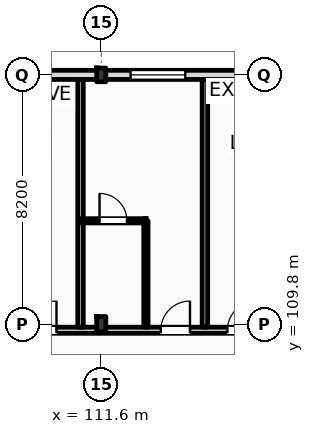
"""IFC4 building model, lengths in metres.
Left out: names, types, materials, properties, quantities, classifications, styles, units other than length and angle.
Written with IfcOpenShell. Run it as: python <this file> out.ifc"""

import sys

from ifc_helpers import new_model, si_unit, direction, frame, frame_2d, origin, origin_2d, place, context, subcontext, project, spatial, rectangle, i_section, extrude, element, fill, save


model = new_model("IFC4")
c1 = context("Model", 3, precision=1e-05, world=origin(), true_north=direction((0.0, 1.0)))
c2 = subcontext(c1, "Body", "Model", "MODEL_VIEW")
j1 = project(units=[si_unit("LENGTHUNIT", "METRE"), si_unit("PLANEANGLEUNIT", "RADIAN")], contexts=[c1])
p1 = place(None, origin())
s1 = spatial("IfcSite", under=j1, at=p1, CompositionType="ELEMENT")
p2 = place(p1, origin())
s2 = spatial("IfcBuilding", under=s1, at=p2, CompositionType="ELEMENT")
p3 = place(p2, frame((0.0, 0.0, 28.2)))
s3 = spatial("IfcBuildingStorey", under=s2, at=p3, CompositionType="ELEMENT", Elevation=28.2)
p4 = place(p3, frame((111.6, 109.8, 0.0), z_axis=(0.0, 0.0, 1.0), x_axis=(1.0, 0.0, 0.0)))
e1 = element("IfcColumn", 1, at=p4, inside=s3, PredefinedType="COLUMN", context=c2, shape_type="SweptSolid", body=[
    extrude(i_section(OverallWidth=0.3, OverallDepth=0.5, WebThickness=0.014, FlangeThickness=0.028, FilletRadius=0.027, at=origin_2d()), origin(), (0.0, 0.0, 1.0), 3.6),
])
p5 = place(p3, frame((111.6, 118.0, 0.0), z_axis=(0.0, 0.0, 1.0), x_axis=(1.0, 0.0, 0.0)))
e2 = element("IfcColumn", 2, at=p5, inside=s3, PredefinedType="COLUMN", context=c2, shape_type="SweptSolid", body=[
    extrude(i_section(OverallWidth=0.3, OverallDepth=0.45, WebThickness=0.014, FlangeThickness=0.026, FilletRadius=0.027, at=origin_2d()), origin(), (0.0, 0.0, 1.0), 3.6),
])
p6 = place(p3, frame((22.5, 118.0, 0.0), z_axis=(0.0, 0.0, 1.0), x_axis=(1.0, 0.0, 0.0)))
e3 = element("IfcWall", 3, at=p6, inside=s3, PredefinedType="STANDARD", context=c2, shape_type="SweptSolid", body=[
    extrude(rectangle(XDim=97.5, YDim=0.3, at=frame_2d((48.75, 0.0))), origin(), (0.0, 0.0, 1.0), 2.8),
])
p7 = place(p6, frame((0.91, 0.0, 0.9)))
e4 = element("IfcOpeningElement", 4, at=p7, cuts=e3, PredefinedType="OPENING", context=c2, shape_type="SweptSolid", body=[
    extrude(rectangle(XDim=0.9, YDim=1.72, at=frame_2d((0.45, 0.86))), frame((0.0, 0.16, 0.0), z_axis=(0.0, -1.0, 0.0), x_axis=(1.0, 0.0, 0.0)), (0.0, 0.0, 1.0), 0.32),
])
p8 = place(p6, frame((6.561, 0.0, 0.0)))
e5 = element("IfcOpeningElement", 5, at=p8, cuts=e3, PredefinedType="OPENING", context=c2, shape_type="SweptSolid", body=[
    extrude(rectangle(XDim=1.2, YDim=2.25, at=frame_2d((0.6, 1.125))), frame((0.0, 0.16, 0.0), z_axis=(0.0, -1.0, 0.0), x_axis=(1.0, 0.0, 0.0)), (0.0, 0.0, 1.0), 0.32),
])
p9 = place(p6, frame((11.477, 0.0, 0.9)))
e6 = element("IfcOpeningElement", 6, at=p9, cuts=e3, PredefinedType="OPENING", context=c2, shape_type="SweptSolid", body=[
    extrude(rectangle(XDim=1.1, YDim=1.5, at=frame_2d((0.55, 0.75))), frame((0.0, 0.16, 0.0), z_axis=(0.0, -1.0, 0.0), x_axis=(1.0, 0.0, 0.0)), (0.0, 0.0, 1.0), 0.32),
])
p10 = place(p6, frame((15.194, 0.0, 0.9)))
e7 = element("IfcOpeningElement", 7, at=p10, cuts=e3, PredefinedType="OPENING", context=c2, shape_type="SweptSolid", body=[
    extrude(rectangle(XDim=1.25, YDim=1.6, at=frame_2d((0.625, 0.8))), frame((0.0, 0.16, 0.0), z_axis=(0.0, -1.0, 0.0), x_axis=(1.0, 0.0, 0.0)), (0.0, 0.0, 1.0), 0.32),
])
p11 = place(p6, frame((19.509, 0.0, 0.9)))
e8 = element("IfcOpeningElement", 8, at=p11, cuts=e3, PredefinedType="OPENING", context=c2, shape_type="SweptSolid", body=[
    extrude(rectangle(XDim=1.4, YDim=1.7, at=frame_2d((0.7, 0.85))), frame((0.0, 0.16, 0.0), z_axis=(0.0, -1.0, 0.0), x_axis=(1.0, 0.0, 0.0)), (0.0, 0.0, 1.0), 0.32),
])
p12 = place(p6, frame((23.258, 0.0, 0.0)))
e9 = element("IfcOpeningElement", 9, at=p12, cuts=e3, PredefinedType="OPENING", context=c2, shape_type="SweptSolid", body=[
    extrude(rectangle(XDim=1.2, YDim=2.25, at=frame_2d((0.6, 1.125))), frame((0.0, 0.16, 0.0), z_axis=(0.0, -1.0, 0.0), x_axis=(1.0, 0.0, 0.0)), (0.0, 0.0, 1.0), 0.32),
])
p13 = place(p6, frame((28.115, 0.0, 0.9)))
e10 = element("IfcOpeningElement", 10, at=p13, cuts=e3, PredefinedType="OPENING", context=c2, shape_type="SweptSolid", body=[
    extrude(rectangle(XDim=1.75, YDim=1.72, at=frame_2d((0.875, 0.86))), frame((0.0, 0.16, 0.0), z_axis=(0.0, -1.0, 0.0), x_axis=(1.0, 0.0, 0.0)), (0.0, 0.0, 1.0), 0.32),
])
p14 = place(p6, frame((31.582, 0.0, 0.9)))
e11 = element("IfcOpeningElement", 11, at=p14, cuts=e3, PredefinedType="OPENING", context=c2, shape_type="SweptSolid", body=[
    extrude(rectangle(XDim=1.35, YDim=1.72, at=frame_2d((0.675, 0.86))), frame((0.0, 0.16, 0.0), z_axis=(0.0, -1.0, 0.0), x_axis=(1.0, 0.0, 0.0)), (0.0, 0.0, 1.0), 0.32),
])
p15 = place(p6, frame((37.379, 0.0, 0.0)))
e12 = element("IfcOpeningElement", 12, at=p15, cuts=e3, PredefinedType="OPENING", context=c2, shape_type="SweptSolid", body=[
    extrude(rectangle(XDim=1.2, YDim=2.25, at=frame_2d((0.6, 1.125))), frame((0.0, 0.16, 0.0), z_axis=(0.0, -1.0, 0.0), x_axis=(1.0, 0.0, 0.0)), (0.0, 0.0, 1.0), 0.32),
])
p16 = place(p6, frame((42.663, 0.0, 0.9)))
e13 = element("IfcOpeningElement", 13, at=p16, cuts=e3, PredefinedType="OPENING", context=c2, shape_type="SweptSolid", body=[
    extrude(rectangle(XDim=1.35, YDim=1.72, at=frame_2d((0.675, 0.86))), frame((0.0, 0.16, 0.0), z_axis=(0.0, -1.0, 0.0), x_axis=(1.0, 0.0, 0.0)), (0.0, 0.0, 1.0), 0.32),
])
p17 = place(p6, frame((45.119, 0.0, 0.9)))
e14 = element("IfcOpeningElement", 14, at=p17, cuts=e3, PredefinedType="OPENING", context=c2, shape_type="SweptSolid", body=[
    extrude(rectangle(XDim=2.871, YDim=1.72, at=frame_2d((1.436, 0.86))), frame((0.0, 0.16, 0.0), z_axis=(0.0, -1.0, 0.0), x_axis=(1.0, 0.0, 0.0)), (0.0, 0.0, 1.0), 0.32),
])
p18 = place(p6, frame((50.41, 0.0, 0.9)))
e15 = element("IfcOpeningElement", 15, at=p18, cuts=e3, PredefinedType="OPENING", context=c2, shape_type="SweptSolid", body=[
    extrude(rectangle(XDim=1.8, YDim=1.72, at=frame_2d((0.9, 0.86))), frame((0.0, 0.16, 0.0), z_axis=(0.0, -1.0, 0.0), x_axis=(1.0, 0.0, 0.0)), (0.0, 0.0, 1.0), 0.32),
])
p19 = place(p6, frame((54.375, 0.0, 0.0)))
e16 = element("IfcOpeningElement", 16, at=p19, cuts=e3, PredefinedType="OPENING", context=c2, shape_type="SweptSolid", body=[
    extrude(rectangle(XDim=1.2, YDim=2.25, at=frame_2d((0.6, 1.125))), frame((0.0, 0.16, 0.0), z_axis=(0.0, -1.0, 0.0), x_axis=(1.0, 0.0, 0.0)), (0.0, 0.0, 1.0), 0.32),
])
p20 = place(p6, frame((59.052, 0.0, 0.9)))
e17 = element("IfcOpeningElement", 17, at=p20, cuts=e3, PredefinedType="OPENING", context=c2, shape_type="SweptSolid", body=[
    extrude(rectangle(XDim=1.35, YDim=1.72, at=frame_2d((0.675, 0.86))), frame((0.0, 0.16, 0.0), z_axis=(0.0, -1.0, 0.0), x_axis=(1.0, 0.0, 0.0)), (0.0, 0.0, 1.0), 0.32),
])
p21 = place(p6, frame((62.768, 0.0, 0.9)))
e18 = element("IfcOpeningElement", 18, at=p21, cuts=e3, PredefinedType="OPENING", context=c2, shape_type="SweptSolid", body=[
    extrude(rectangle(XDim=1.5, YDim=1.72, at=frame_2d((0.75, 0.86))), frame((0.0, 0.16, 0.0), z_axis=(0.0, -1.0, 0.0), x_axis=(1.0, 0.0, 0.0)), (0.0, 0.0, 1.0), 0.32),
])
p22 = place(p6, frame((68.498, 0.0, 0.0)))
e19 = element("IfcOpeningElement", 19, at=p22, cuts=e3, PredefinedType="OPENING", context=c2, shape_type="SweptSolid", body=[
    extrude(rectangle(XDim=1.2, YDim=2.25, at=frame_2d((0.6, 1.125))), frame((0.0, 0.16, 0.0), z_axis=(0.0, -1.0, 0.0), x_axis=(1.0, 0.0, 0.0)), (0.0, 0.0, 1.0), 0.32),
])
p23 = place(p6, frame((71.265, 0.0, 0.9)))
e20 = element("IfcOpeningElement", 20, at=p23, cuts=e3, PredefinedType="OPENING", context=c2, shape_type="SweptSolid", body=[
    extrude(rectangle(XDim=0.9, YDim=1.72, at=frame_2d((0.45, 0.86))), frame((0.0, 0.16, 0.0), z_axis=(0.0, -1.0, 0.0), x_axis=(1.0, 0.0, 0.0)), (0.0, 0.0, 1.0), 0.32),
])
p24 = place(p6, frame((76.316, 0.0, 0.9)))
e21 = element("IfcOpeningElement", 21, at=p24, cuts=e3, PredefinedType="OPENING", context=c2, shape_type="SweptSolid", body=[
    extrude(rectangle(XDim=1.95, YDim=1.72, at=frame_2d((0.975, 0.86))), frame((0.0, 0.16, 0.0), z_axis=(0.0, -1.0, 0.0), x_axis=(1.0, 0.0, 0.0)), (0.0, 0.0, 1.0), 0.32),
])
p25 = place(p6, frame((81.632, 0.0, 0.9)))
e22 = element("IfcOpeningElement", 22, at=p25, cuts=e3, PredefinedType="OPENING", context=c2, shape_type="SweptSolid", body=[
    extrude(rectangle(XDim=1.35, YDim=1.72, at=frame_2d((0.675, 0.86))), frame((0.0, 0.16, 0.0), z_axis=(0.0, -1.0, 0.0), x_axis=(1.0, 0.0, 0.0)), (0.0, 0.0, 1.0), 0.32),
])
p26 = place(p6, frame((84.948, 0.0, 0.9)))
e23 = element("IfcOpeningElement", 23, at=p26, cuts=e3, PredefinedType="OPENING", context=c2, shape_type="SweptSolid", body=[
    extrude(rectangle(XDim=2.25, YDim=1.72, at=frame_2d((1.125, 0.86))), frame((0.0, 0.16, 0.0), z_axis=(0.0, -1.0, 0.0), x_axis=(1.0, 0.0, 0.0)), (0.0, 0.0, 1.0), 0.32),
])
p27 = place(p6, frame((90.063, 0.0, 0.9)))
e24 = element("IfcOpeningElement", 24, at=p27, cuts=e3, PredefinedType="OPENING", context=c2, shape_type="SweptSolid", body=[
    extrude(rectangle(XDim=1.8, YDim=1.72, at=frame_2d((0.9, 0.86))), frame((0.0, 0.16, 0.0), z_axis=(0.0, -1.0, 0.0), x_axis=(1.0, 0.0, 0.0)), (0.0, 0.0, 1.0), 0.32),
])
p28 = place(p6, frame((93.529, 0.0, 0.9)))
e25 = element("IfcOpeningElement", 25, at=p28, cuts=e3, PredefinedType="OPENING", context=c2, shape_type="SweptSolid", body=[
    extrude(rectangle(XDim=2.55, YDim=1.72, at=frame_2d((1.275, 0.86))), frame((0.0, 0.16, 0.0), z_axis=(0.0, -1.0, 0.0), x_axis=(1.0, 0.0, 0.0)), (0.0, 0.0, 1.0), 0.32),
])
p29 = place(p3, frame((10.65, 109.6, 0.0), z_axis=(0.0, 0.0, 1.0), x_axis=(1.0, 0.0, 0.0)))
e26 = element("IfcWall", 26, at=p29, inside=s3, PredefinedType="PARTITIONING", context=c2, shape_type="SweptSolid", body=[
    extrude(rectangle(XDim=109.21, YDim=0.2, at=frame_2d((54.605, 0.0))), origin(), (0.0, 0.0, 1.0), 2.8),
])
p30 = place(p29, frame((12.611, 0.0, 0.0)))
e27 = element("IfcOpeningElement", 27, at=p30, cuts=e26, PredefinedType="OPENING", context=c2, shape_type="SweptSolid", body=[
    extrude(rectangle(XDim=1.02, YDim=2.2, at=frame_2d((0.51, 1.1))), frame((0.0, 0.11, 0.0), z_axis=(0.0, -1.0, 0.0), x_axis=(1.0, 0.0, 0.0)), (0.0, 0.0, 1.0), 0.22),
])
p31 = place(p29, frame((19.451, 0.0, 0.0)))
e28 = element("IfcOpeningElement", 28, at=p31, cuts=e26, PredefinedType="OPENING", context=c2, shape_type="SweptSolid", body=[
    extrude(rectangle(XDim=1.02, YDim=2.2, at=frame_2d((0.51, 1.1))), frame((0.0, 0.11, 0.0), z_axis=(0.0, -1.0, 0.0), x_axis=(1.0, 0.0, 0.0)), (0.0, 0.0, 1.0), 0.22),
])
p32 = place(p29, frame((23.842, 0.0, 0.0)))
e29 = element("IfcOpeningElement", 29, at=p32, cuts=e26, PredefinedType="OPENING", context=c2, shape_type="SweptSolid", body=[
    extrude(rectangle(XDim=1.02, YDim=2.2, at=frame_2d((0.51, 1.1))), frame((0.0, 0.11, 0.0), z_axis=(0.0, -1.0, 0.0), x_axis=(1.0, 0.0, 0.0)), (0.0, 0.0, 1.0), 0.22),
])
p33 = place(p29, frame((26.084, 0.0, 0.0)))
e30 = element("IfcOpeningElement", 30, at=p33, cuts=e26, PredefinedType="OPENING", context=c2, shape_type="SweptSolid", body=[
    extrude(rectangle(XDim=1.02, YDim=2.2, at=frame_2d((0.51, 1.1))), frame((0.0, 0.11, 0.0), z_axis=(0.0, -1.0, 0.0), x_axis=(1.0, 0.0, 0.0)), (0.0, 0.0, 1.0), 0.22),
])
p34 = place(p29, frame((32.655, 0.0, 0.0)))
e31 = element("IfcOpeningElement", 31, at=p34, cuts=e26, PredefinedType="OPENING", context=c2, shape_type="SweptSolid", body=[
    extrude(rectangle(XDim=0.96, YDim=2.2, at=frame_2d((0.48, 1.1))), frame((0.0, 0.11, 0.0), z_axis=(0.0, -1.0, 0.0), x_axis=(1.0, 0.0, 0.0)), (0.0, 0.0, 1.0), 0.22),
])
p35 = place(p29, frame((34.895, 0.0, 0.0)))
e32 = element("IfcOpeningElement", 32, at=p35, cuts=e26, PredefinedType="OPENING", context=c2, shape_type="SweptSolid", body=[
    extrude(rectangle(XDim=0.96, YDim=2.2, at=frame_2d((0.48, 1.1))), frame((0.0, 0.11, 0.0), z_axis=(0.0, -1.0, 0.0), x_axis=(1.0, 0.0, 0.0)), (0.0, 0.0, 1.0), 0.22),
])
p36 = place(p29, frame((41.436, 0.0, 0.0)))
e33 = element("IfcOpeningElement", 33, at=p36, cuts=e26, PredefinedType="OPENING", context=c2, shape_type="SweptSolid", body=[
    extrude(rectangle(XDim=0.96, YDim=2.2, at=frame_2d((0.48, 1.1))), frame((0.0, 0.11, 0.0), z_axis=(0.0, -1.0, 0.0), x_axis=(1.0, 0.0, 0.0)), (0.0, 0.0, 1.0), 0.22),
])
p37 = place(p29, frame((43.427, 0.0, 0.0)))
e34 = element("IfcOpeningElement", 34, at=p37, cuts=e26, PredefinedType="OPENING", context=c2, shape_type="SweptSolid", body=[
    extrude(rectangle(XDim=0.96, YDim=2.2, at=frame_2d((0.48, 1.1))), frame((0.0, 0.11, 0.0), z_axis=(0.0, -1.0, 0.0), x_axis=(1.0, 0.0, 0.0)), (0.0, 0.0, 1.0), 0.22),
])
p38 = place(p29, frame((50.218, 0.0, 0.0)))
e35 = element("IfcOpeningElement", 35, at=p38, cuts=e26, PredefinedType="OPENING", context=c2, shape_type="SweptSolid", body=[
    extrude(rectangle(XDim=0.96, YDim=2.2, at=frame_2d((0.48, 1.1))), frame((0.0, 0.11, 0.0), z_axis=(0.0, -1.0, 0.0), x_axis=(1.0, 0.0, 0.0)), (0.0, 0.0, 1.0), 0.22),
])
p39 = place(p29, frame((54.859, 0.0, 0.0)))
e36 = element("IfcOpeningElement", 36, at=p39, cuts=e26, PredefinedType="OPENING", context=c2, shape_type="SweptSolid", body=[
    extrude(rectangle(XDim=0.96, YDim=2.2, at=frame_2d((0.48, 1.1))), frame((0.0, 0.11, 0.0), z_axis=(0.0, -1.0, 0.0), x_axis=(1.0, 0.0, 0.0)), (0.0, 0.0, 1.0), 0.22),
])
p40 = place(p29, frame((59.0, 0.0, 0.0)))
e37 = element("IfcOpeningElement", 37, at=p40, cuts=e26, PredefinedType="OPENING", context=c2, shape_type="SweptSolid", body=[
    extrude(rectangle(XDim=0.96, YDim=2.2, at=frame_2d((0.48, 1.1))), frame((0.0, 0.11, 0.0), z_axis=(0.0, -1.0, 0.0), x_axis=(1.0, 0.0, 0.0)), (0.0, 0.0, 1.0), 0.22),
])
p41 = place(p29, frame((63.39, 0.0, 0.0)))
e38 = element("IfcOpeningElement", 38, at=p41, cuts=e26, PredefinedType="OPENING", context=c2, shape_type="SweptSolid", body=[
    extrude(rectangle(XDim=0.96, YDim=2.2, at=frame_2d((0.48, 1.1))), frame((0.0, 0.11, 0.0), z_axis=(0.0, -1.0, 0.0), x_axis=(1.0, 0.0, 0.0)), (0.0, 0.0, 1.0), 0.22),
])
p42 = place(p29, frame((65.631, 0.0, 0.0)))
e39 = element("IfcOpeningElement", 39, at=p42, cuts=e26, PredefinedType="OPENING", context=c2, shape_type="SweptSolid", body=[
    extrude(rectangle(XDim=0.96, YDim=2.2, at=frame_2d((0.48, 1.1))), frame((0.0, 0.11, 0.0), z_axis=(0.0, -1.0, 0.0), x_axis=(1.0, 0.0, 0.0)), (0.0, 0.0, 1.0), 0.22),
])
p43 = place(p29, frame((72.172, 0.0, 0.0)))
e40 = element("IfcOpeningElement", 40, at=p43, cuts=e26, PredefinedType="OPENING", context=c2, shape_type="SweptSolid", body=[
    extrude(rectangle(XDim=0.96, YDim=2.2, at=frame_2d((0.48, 1.1))), frame((0.0, 0.11, 0.0), z_axis=(0.0, -1.0, 0.0), x_axis=(1.0, 0.0, 0.0)), (0.0, 0.0, 1.0), 0.22),
])
p44 = place(p29, frame((74.413, 0.0, 0.0)))
e41 = element("IfcOpeningElement", 41, at=p44, cuts=e26, PredefinedType="OPENING", context=c2, shape_type="SweptSolid", body=[
    extrude(rectangle(XDim=0.96, YDim=2.2, at=frame_2d((0.48, 1.1))), frame((0.0, 0.11, 0.0), z_axis=(0.0, -1.0, 0.0), x_axis=(1.0, 0.0, 0.0)), (0.0, 0.0, 1.0), 0.22),
])
p45 = place(p29, frame((80.954, 0.0, 0.0)))
e42 = element("IfcOpeningElement", 42, at=p45, cuts=e26, PredefinedType="OPENING", context=c2, shape_type="SweptSolid", body=[
    extrude(rectangle(XDim=0.96, YDim=2.2, at=frame_2d((0.48, 1.1))), frame((0.0, 0.11, 0.0), z_axis=(0.0, -1.0, 0.0), x_axis=(1.0, 0.0, 0.0)), (0.0, 0.0, 1.0), 0.22),
])
p46 = place(p29, frame((83.195, 0.0, 0.0)))
e43 = element("IfcOpeningElement", 43, at=p46, cuts=e26, PredefinedType="OPENING", context=c2, shape_type="SweptSolid", body=[
    extrude(rectangle(XDim=0.96, YDim=2.2, at=frame_2d((0.48, 1.1))), frame((0.0, 0.11, 0.0), z_axis=(0.0, -1.0, 0.0), x_axis=(1.0, 0.0, 0.0)), (0.0, 0.0, 1.0), 0.22),
])
p47 = place(p29, frame((89.735, 0.0, 0.0)))
e44 = element("IfcOpeningElement", 44, at=p47, cuts=e26, PredefinedType="OPENING", context=c2, shape_type="SweptSolid", body=[
    extrude(rectangle(XDim=0.96, YDim=2.2, at=frame_2d((0.48, 1.1))), frame((0.0, 0.11, 0.0), z_axis=(0.0, -1.0, 0.0), x_axis=(1.0, 0.0, 0.0)), (0.0, 0.0, 1.0), 0.22),
])
p48 = place(p29, frame((94.126, 0.0, 0.0)))
e45 = element("IfcOpeningElement", 45, at=p48, cuts=e26, PredefinedType="OPENING", context=c2, shape_type="SweptSolid", body=[
    extrude(rectangle(XDim=0.96, YDim=2.2, at=frame_2d((0.48, 1.1))), frame((0.0, 0.11, 0.0), z_axis=(0.0, -1.0, 0.0), x_axis=(1.0, 0.0, 0.0)), (0.0, 0.0, 1.0), 0.22),
])
p49 = place(p29, frame((98.517, 0.0, 0.0)))
e46 = element("IfcOpeningElement", 46, at=p49, cuts=e26, PredefinedType="OPENING", context=c2, shape_type="SweptSolid", body=[
    extrude(rectangle(XDim=0.96, YDim=2.2, at=frame_2d((0.48, 1.1))), frame((0.0, 0.11, 0.0), z_axis=(0.0, -1.0, 0.0), x_axis=(1.0, 0.0, 0.0)), (0.0, 0.0, 1.0), 0.22),
])
p50 = place(p29, frame((102.908, 0.0, 0.0)))
e47 = element("IfcOpeningElement", 47, at=p50, cuts=e26, PredefinedType="OPENING", context=c2, shape_type="SweptSolid", body=[
    extrude(rectangle(XDim=0.96, YDim=2.2, at=frame_2d((0.48, 1.1))), frame((0.0, 0.11, 0.0), z_axis=(0.0, -1.0, 0.0), x_axis=(1.0, 0.0, 0.0)), (0.0, 0.0, 1.0), 0.22),
])
p51 = place(p29, frame((105.099, 0.0, 0.0)))
e48 = element("IfcOpeningElement", 48, at=p51, cuts=e26, PredefinedType="OPENING", context=c2, shape_type="SweptSolid", body=[
    extrude(rectangle(XDim=0.96, YDim=2.2, at=frame_2d((0.48, 1.1))), frame((0.0, 0.11, 0.0), z_axis=(0.0, -1.0, 0.0), x_axis=(1.0, 0.0, 0.0)), (0.0, 0.0, 1.0), 0.22),
])
p52 = place(p29, frame((2.716, 0.0, 0.0)))
e49 = element("IfcOpeningElement", 49, at=p52, cuts=e26, PredefinedType="OPENING", context=c2, shape_type="SweptSolid", body=[
    extrude(rectangle(XDim=1.35, YDim=2.25, at=frame_2d((0.675, 1.125))), frame((0.0, 0.11, 0.0), z_axis=(0.0, -1.0, 0.0), x_axis=(1.0, 0.0, 0.0)), (0.0, 0.0, 1.0), 0.22),
])
p53 = place(p29, frame((6.65, 0.0, 0.0)))
e50 = element("IfcOpeningElement", 50, at=p53, cuts=e26, PredefinedType="OPENING", context=c2, shape_type="SweptSolid", body=[
    extrude(rectangle(XDim=1.35, YDim=2.25, at=frame_2d((0.675, 1.125))), frame((0.0, 0.11, 0.0), z_axis=(0.0, -1.0, 0.0), x_axis=(1.0, 0.0, 0.0)), (0.0, 0.0, 1.0), 0.22),
])
p54 = place(p29, frame((10.583, 0.0, 0.0)))
e51 = element("IfcOpeningElement", 51, at=p54, cuts=e26, PredefinedType="OPENING", context=c2, shape_type="SweptSolid", body=[
    extrude(rectangle(XDim=1.35, YDim=2.25, at=frame_2d((0.675, 1.125))), frame((0.0, 0.11, 0.0), z_axis=(0.0, -1.0, 0.0), x_axis=(1.0, 0.0, 0.0)), (0.0, 0.0, 1.0), 0.22),
])
for number, where, z_axis, x_axis in (
    (52, (110.918, 109.7, 0.0), (0.0, 0.0, 1.0), (0.0, 1.0, 0.0)),
    (53, (115.009, 109.7, 0.0), (0.0, 0.0, 1.0), (0.0, 1.0, 0.0)),
):
    element("IfcWall", number, at=place(p3, frame(where, z_axis=z_axis, x_axis=x_axis)), inside=s3, PredefinedType="PARTITIONING", context=c2, shape_type="SweptSolid", body=[
        extrude(rectangle(XDim=8.15, YDim=0.18, at=frame_2d((4.075, 0.0))), origin(), (0.0, 0.0, 1.0), 3.36),
    ])
p55 = place(p3, frame((113.068, 109.7, 0.0), z_axis=(0.0, 0.0, 1.0), x_axis=(0.0, 1.0, 0.0)))
e54 = element("IfcWall", 54, at=p55, inside=s3, PredefinedType="PARTITIONING", context=c2, shape_type="SweptSolid", body=[
    extrude(rectangle(XDim=3.5, YDim=0.14, at=frame_2d((1.75, 0.0))), origin(), (0.0, 0.0, 1.0), 3.36),
])
p56 = place(p3, frame((110.918, 113.2, 0.0), z_axis=(0.0, 0.0, 1.0), x_axis=(1.0, 0.0, 0.0)))
e55 = element("IfcWall", 55, at=p56, inside=s3, PredefinedType="PARTITIONING", context=c2, shape_type="SweptSolid", body=[
    extrude(rectangle(XDim=2.15, YDim=0.14, at=frame_2d((1.075, 0.0))), origin(), (0.0, 0.0, 1.0), 3.36),
])
p57 = place(p56, frame((0.625, 0.0, 0.0)))
e56 = element("IfcOpeningElement", 56, at=p57, cuts=e55, PredefinedType="OPENING", context=c2, shape_type="SweptSolid", body=[
    extrude(rectangle(XDim=0.9, YDim=2.1, at=frame_2d((0.45, 1.05))), frame((0.0, 0.08, 0.0), z_axis=(0.0, -1.0, 0.0), x_axis=(1.0, 0.0, 0.0)), (0.0, 0.0, 1.0), 0.16),
])
p58 = place(p27, origin())
e57 = element("IfcWindow", 57, at=p58, inside=s3, PartitioningType="DOUBLE_PANEL_VERTICAL", PredefinedType="WINDOW", context=c2, shape_type="SweptSolid", body=[
    extrude(rectangle(XDim=1.8, YDim=1.72, at=frame_2d((0.9, 0.86))), frame((0.0, 0.03, 0.0), z_axis=(0.0, -1.0, 0.0), x_axis=(1.0, 0.0, 0.0)), (0.0, 0.0, 1.0), 0.06),
])
fill(e24, e57)
p59 = place(p49, origin())
e58 = element("IfcDoor", 58, at=p59, inside=s3, OperationType="SINGLE_SWING_RIGHT", PredefinedType="DOOR", context=c2, shape_type="SweptSolid", body=[
    extrude(rectangle(XDim=0.96, YDim=2.2, at=frame_2d((0.48, 1.1))), frame((0.0, 0.025, 0.0), z_axis=(0.0, -1.0, 0.0), x_axis=(1.0, 0.0, 0.0)), (0.0, 0.0, 1.0), 0.05),
])
fill(e46, e58)
p60 = place(p50, origin())
e59 = element("IfcDoor", 59, at=p60, inside=s3, OperationType="SINGLE_SWING_RIGHT", PredefinedType="DOOR", context=c2, shape_type="SweptSolid", body=[
    extrude(rectangle(XDim=0.96, YDim=2.2, at=frame_2d((0.48, 1.1))), frame((0.0, 0.025, 0.0), z_axis=(0.0, -1.0, 0.0), x_axis=(1.0, 0.0, 0.0)), (0.0, 0.0, 1.0), 0.05),
])
fill(e47, e59)
p61 = place(p57, origin())
e60 = element("IfcDoor", 60, at=p61, inside=s3, OperationType="SINGLE_SWING_LEFT", PredefinedType="DOOR", context=c2, shape_type="SweptSolid", body=[
    extrude(rectangle(XDim=0.9, YDim=2.1, at=frame_2d((0.45, 1.05))), frame((0.0, 0.025, 0.0), z_axis=(0.0, -1.0, 0.0), x_axis=(1.0, 0.0, 0.0)), (0.0, 0.0, 1.0), 0.05),
])
fill(e56, e60)
p62 = place(p51, origin())
e61 = element("IfcDoor", 61, at=p62, inside=s3, OperationType="SINGLE_SWING_RIGHT", PredefinedType="DOOR", context=c2, shape_type="SweptSolid", body=[
    extrude(rectangle(XDim=0.96, YDim=2.2, at=frame_2d((0.48, 1.1))), frame((0.0, 0.025, 0.0), z_axis=(0.0, -1.0, 0.0), x_axis=(1.0, 0.0, 0.0)), (0.0, 0.0, 1.0), 0.05),
])
fill(e48, e61)
save(model, sys.argv[1])
